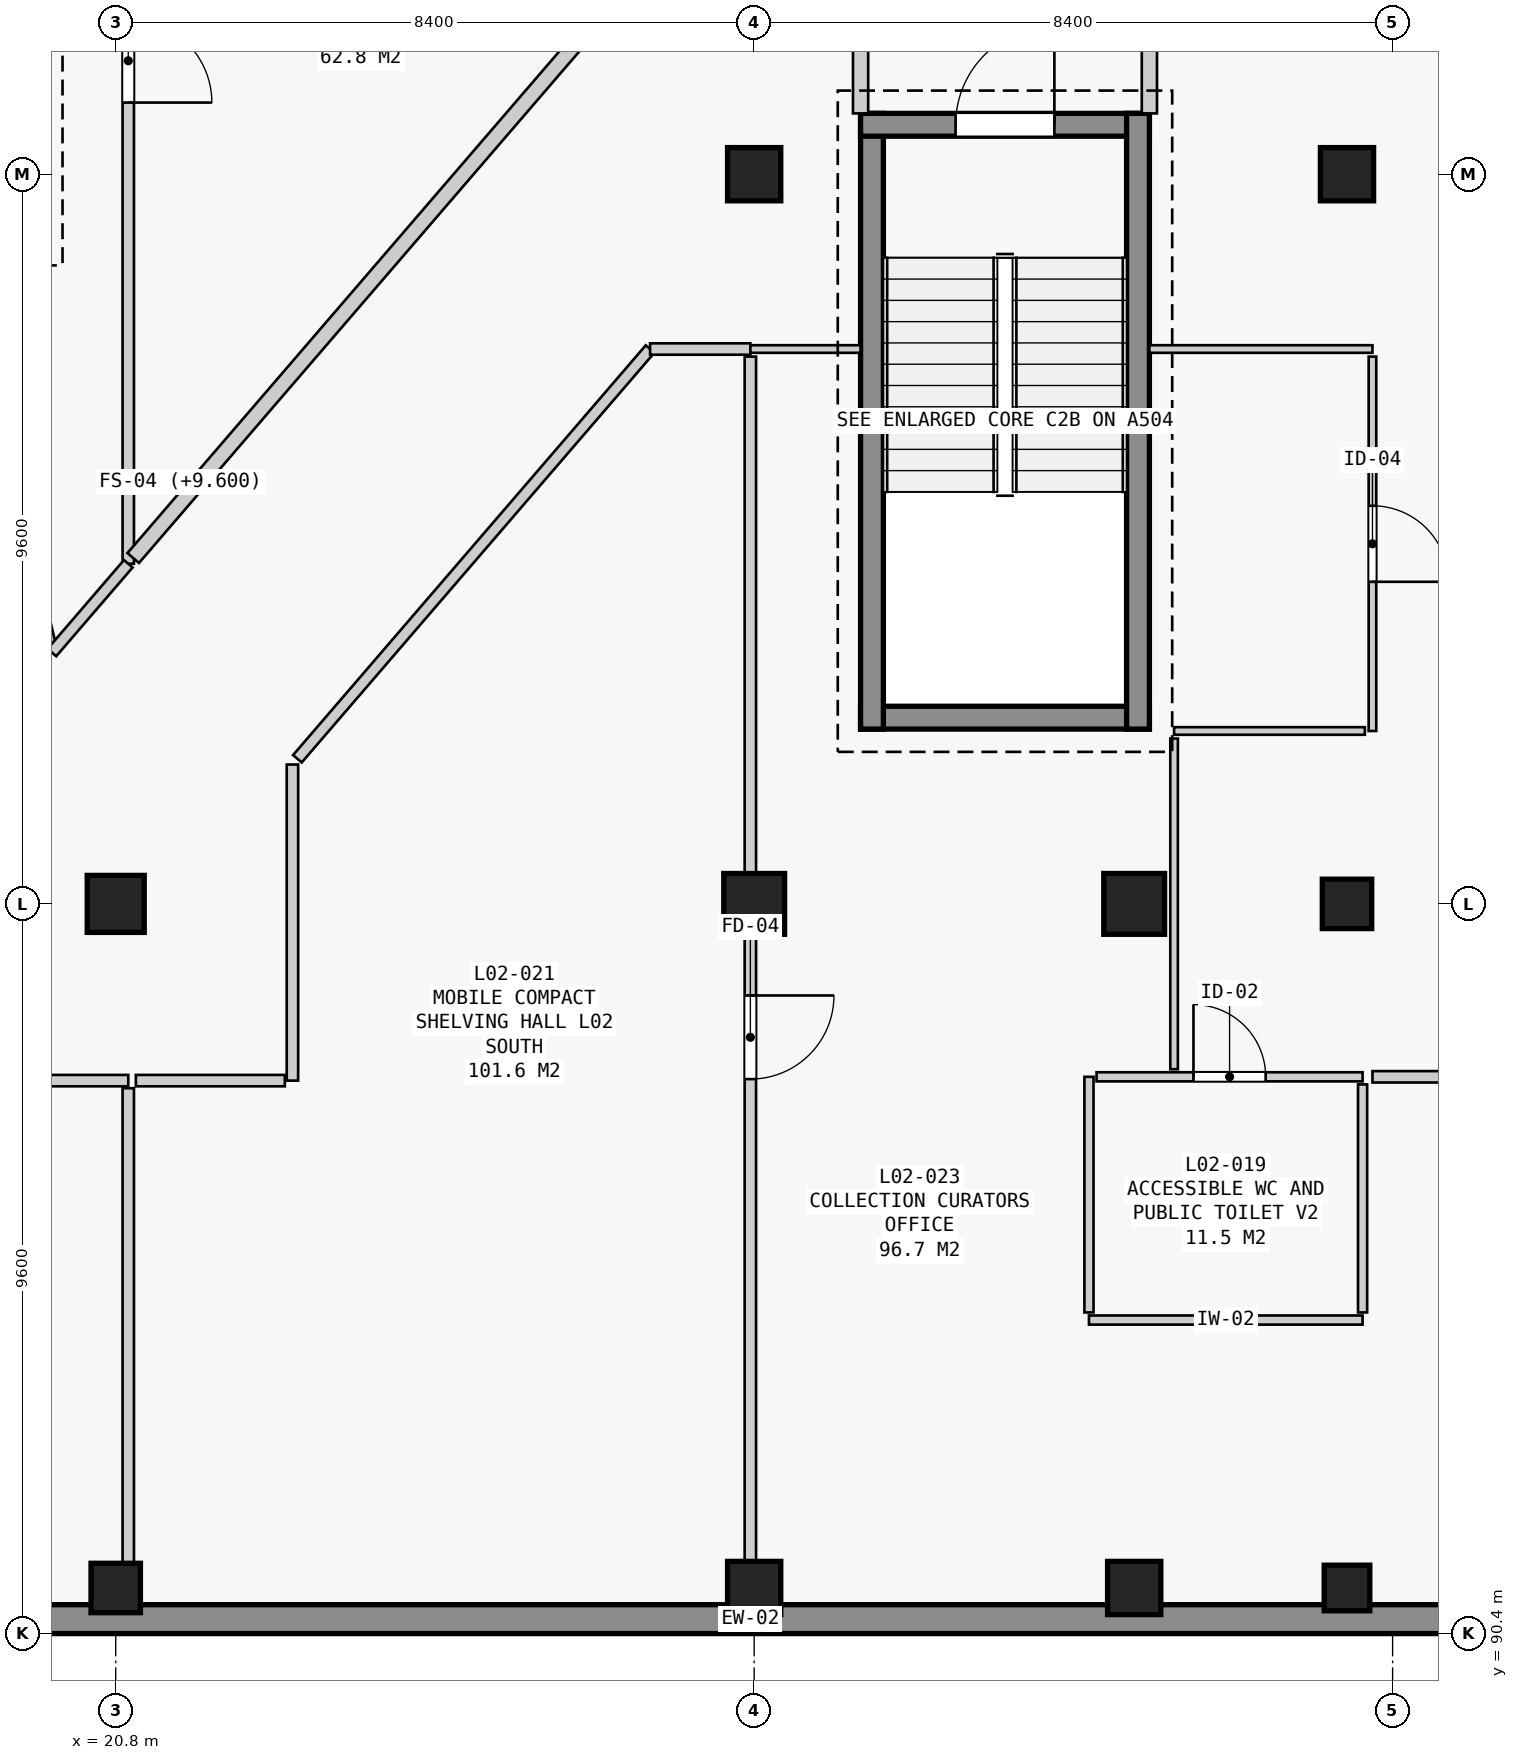
"""IFC4 building model, lengths in metres.
Left out: names, types, materials, properties, quantities, classifications, styles, units other than length and angle.
Written with IfcOpenShell. Run it as: python <this file> out.ifc"""

import sys

from ifc_helpers import new_model, si_unit, direction, frame, frame_2d, origin, origin_2d, place, context, subcontext, project, spatial, rectangle, extrude, element, fill, save


model = new_model("IFC4")
c1 = context("Model", 3, precision=1e-05, world=origin(), true_north=direction((0.0, 1.0)))
c2 = subcontext(c1, "Body", "Model", "MODEL_VIEW")
j1 = project(units=[si_unit("LENGTHUNIT", "METRE"), si_unit("PLANEANGLEUNIT", "RADIAN")], contexts=[c1])
p1 = place(None, origin())
s1 = spatial("IfcSite", under=j1, at=p1, CompositionType="ELEMENT")
p2 = place(p1, origin())
s2 = spatial("IfcBuilding", under=s1, at=p2, CompositionType="ELEMENT")
p3 = place(p2, frame((0.0, 0.0, 9.6)))
s3 = spatial("IfcBuildingStorey", under=s2, at=p3, CompositionType="ELEMENT", Elevation=9.6)
p4 = place(p3, frame((20.8, 91.0, 0.0), z_axis=(0.0, 0.0, 1.0), x_axis=(1.0, 0.0, 0.0)))
e1 = element("IfcColumn", 1, at=p4, inside=s3, PredefinedType="COLUMN", context=c2, shape_type="SweptSolid", body=[
    extrude(rectangle(XDim=0.65, YDim=0.65, at=origin_2d()), origin(), (0.0, 0.0, 1.0), 4.2),
])
p5 = place(p3, frame((20.8, 100.0, 0.0), z_axis=(0.0, 0.0, 1.0), x_axis=(1.0, 0.0, 0.0)))
e2 = element("IfcColumn", 2, at=p5, inside=s3, PredefinedType="COLUMN", context=c2, shape_type="SweptSolid", body=[
    extrude(rectangle(XDim=0.75, YDim=0.75, at=origin_2d()), origin(), (0.0, 0.0, 1.0), 4.2),
])
p6 = place(p3, frame((29.2, 91.0, 0.0), z_axis=(0.0, 0.0, 1.0), x_axis=(1.0, 0.0, 0.0)))
e3 = element("IfcColumn", 3, at=p6, inside=s3, PredefinedType="COLUMN", context=c2, shape_type="SweptSolid", body=[
    extrude(rectangle(XDim=0.7, YDim=0.7, at=origin_2d()), origin(), (0.0, 0.0, 1.0), 4.2),
])
p7 = place(p3, frame((29.2, 100.0, 0.0), z_axis=(0.0, 0.0, 1.0), x_axis=(1.0, 0.0, 0.0)))
e4 = element("IfcColumn", 4, at=p7, inside=s3, PredefinedType="COLUMN", context=c2, shape_type="SweptSolid", body=[
    extrude(rectangle(XDim=0.8, YDim=0.8, at=origin_2d()), origin(), (0.0, 0.0, 1.0), 4.2),
])
for number, where, z_axis, x_axis in (
    (5, (29.2, 109.6, 0.0), (0.0, 0.0, 1.0), (1.0, 0.0, 0.0)),
    (6, (34.2, 91.0, 0.0), (0.0, 0.0, 1.0), (1.0, 0.0, 0.0)),
):
    element("IfcColumn", number, at=place(p3, frame(where, z_axis=z_axis, x_axis=x_axis)), inside=s3, PredefinedType="COLUMN", context=c2, shape_type="SweptSolid", body=[
        extrude(rectangle(XDim=0.7, YDim=0.7, at=origin_2d()), origin(), (0.0, 0.0, 1.0), 4.2),
    ])
p8 = place(p3, frame((34.2, 100.0, 0.0), z_axis=(0.0, 0.0, 1.0), x_axis=(1.0, 0.0, 0.0)))
e7 = element("IfcColumn", 7, at=p8, inside=s3, PredefinedType="COLUMN", context=c2, shape_type="SweptSolid", body=[
    extrude(rectangle(XDim=0.8, YDim=0.8, at=origin_2d()), origin(), (0.0, 0.0, 1.0), 4.2),
])
p9 = place(p3, frame((37.0, 91.0, 0.0), z_axis=(0.0, 0.0, 1.0), x_axis=(1.0, 0.0, 0.0)))
e8 = element("IfcColumn", 8, at=p9, inside=s3, PredefinedType="COLUMN", context=c2, shape_type="SweptSolid", body=[
    extrude(rectangle(XDim=0.6, YDim=0.6, at=origin_2d()), origin(), (0.0, 0.0, 1.0), 4.2),
])
p10 = place(p3, frame((37.0, 100.0, 0.0), z_axis=(0.0, 0.0, 1.0), x_axis=(1.0, 0.0, 0.0)))
e9 = element("IfcColumn", 9, at=p10, inside=s3, PredefinedType="COLUMN", context=c2, shape_type="SweptSolid", body=[
    extrude(rectangle(XDim=0.65, YDim=0.65, at=origin_2d()), origin(), (0.0, 0.0, 1.0), 4.2),
])
p11 = place(p3, frame((37.0, 109.6, 0.0), z_axis=(0.0, 0.0, 1.0), x_axis=(1.0, 0.0, 0.0)))
e10 = element("IfcColumn", 10, at=p11, inside=s3, PredefinedType="COLUMN", context=c2, shape_type="SweptSolid", body=[
    extrude(rectangle(XDim=0.7, YDim=0.7, at=origin_2d()), origin(), (0.0, 0.0, 1.0), 4.2),
])
p12 = place(p3, frame((45.71, 90.59, 0.0), z_axis=(0.0, 0.0, 1.0), x_axis=(-1.0, 0.0, 0.0)))
e11 = element("IfcWall", 11, at=p12, inside=s3, PredefinedType="STANDARD", context=c2, shape_type="SweptSolid", body=[
    extrude(rectangle(XDim=33.12, YDim=0.38, at=frame_2d((16.56, 0.0))), origin(), (0.0, 0.0, 1.0), 3.88),
])
p13 = place(p3, frame((34.4, 102.45, 0.0), z_axis=(0.0, 0.0, 1.0), x_axis=(-1.0, 0.0, 0.0)))
e12 = element("IfcWall", 12, at=p13, inside=s3, PredefinedType="SHEAR", context=c2, shape_type="SweptSolid", body=[
    extrude(rectangle(XDim=3.8, YDim=0.3, at=frame_2d((1.9, 0.0))), origin(), (0.0, 0.0, 1.0), 3.88),
])
p14 = place(p3, frame((30.75, 102.3, 0.0), z_axis=(0.0, 0.0, 1.0), x_axis=(0.0, 1.0, 0.0)))
e13 = element("IfcWall", 13, at=p14, inside=s3, PredefinedType="SHEAR", context=c2, shape_type="SweptSolid", body=[
    extrude(rectangle(XDim=8.1, YDim=0.3, at=frame_2d((4.05, 0.0))), origin(), (0.0, 0.0, 1.0), 3.88),
])
p15 = place(p3, frame((30.6, 110.25, 0.0), z_axis=(0.0, 0.0, 1.0), x_axis=(1.0, 0.0, 0.0)))
e14 = element("IfcWall", 14, at=p15, inside=s3, PredefinedType="SHEAR", context=c2, shape_type="SweptSolid", body=[
    extrude(rectangle(XDim=3.8, YDim=0.3, at=frame_2d((1.9, 0.0))), origin(), (0.0, 0.0, 1.0), 3.88),
])
p16 = place(p15, frame((1.25, 0.0, 0.0)))
e15 = element("IfcOpeningElement", 15, at=p16, cuts=e14, PredefinedType="OPENING", context=c2, shape_type="SweptSolid", body=[
    extrude(rectangle(XDim=1.3, YDim=2.2, at=frame_2d((0.65, 1.1))), frame((0.0, 0.16, 0.0), z_axis=(0.0, -1.0, 0.0), x_axis=(1.0, 0.0, 0.0)), (0.0, 0.0, 1.0), 0.32),
])
p17 = place(p3, frame((34.25, 110.4, 0.0), z_axis=(0.0, 0.0, 1.0), x_axis=(0.0, -1.0, 0.0)))
e16 = element("IfcWall", 16, at=p17, inside=s3, PredefinedType="SHEAR", context=c2, shape_type="SweptSolid", body=[
    extrude(rectangle(XDim=8.1, YDim=0.3, at=frame_2d((4.05, 0.0))), origin(), (0.0, 0.0, 1.0), 3.88),
])
for number, where, z_axis, x_axis in (
    (17, (30.6, 110.4, 0.0), (0.0, 0.0, 1.0), (0.0, 1.0, 0.0)),
    (18, (34.4, 113.8, 0.0), (0.0, 0.0, 1.0), (0.0, -1.0, 0.0)),
):
    element("IfcWall", number, at=place(p3, frame(where, z_axis=z_axis, x_axis=x_axis)), inside=s3, PredefinedType="STANDARD", context=c2, shape_type="SweptSolid", body=[
        extrude(rectangle(XDim=3.4, YDim=0.2, at=frame_2d((1.7, 0.0))), origin(), (0.0, 0.0, 1.0), 3.88),
    ])
p18 = place(p3, frame((37.205, 94.525, 0.0), z_axis=(0.0, 0.0, 1.0), x_axis=(-1.0, 0.0, 0.0)))
e19 = element("IfcWall", 19, at=p18, inside=s3, PredefinedType="PARTITIONING", context=c2, shape_type="SweptSolid", body=[
    extrude(rectangle(XDim=3.6, YDim=0.12, at=frame_2d((1.8, 0.0))), origin(), (0.0, 0.0, 1.0), 3.01),
])
p19 = place(p3, frame((33.605, 94.625, 0.0), z_axis=(0.0, 0.0, 1.0), x_axis=(0.0, 1.0, 0.0)))
e20 = element("IfcWall", 20, at=p19, inside=s3, PredefinedType="PARTITIONING", context=c2, shape_type="SweptSolid", body=[
    extrude(rectangle(XDim=3.1, YDim=0.12, at=frame_2d((1.55, 0.0))), origin(), (0.0, 0.0, 1.0), 3.88),
])
p20 = place(p3, frame((33.705, 97.725, 0.0), z_axis=(0.0, 0.0, 1.0), x_axis=(1.0, 0.0, 0.0)))
e21 = element("IfcWall", 21, at=p20, inside=s3, PredefinedType="PARTITIONING", context=c2, shape_type="SweptSolid", body=[
    extrude(rectangle(XDim=3.5, YDim=0.12, at=frame_2d((1.75, 0.0))), origin(), (0.0, 0.0, 1.0), 3.01),
])
p21 = place(p20, frame((1.275, 0.0, 0.0)))
e22 = element("IfcOpeningElement", 22, at=p21, cuts=e21, PredefinedType="OPENING", context=c2, shape_type="SweptSolid", body=[
    extrude(rectangle(XDim=0.95, YDim=2.15, at=frame_2d((0.475, 1.075))), frame((0.0, 0.07, 0.0), z_axis=(0.0, -1.0, 0.0), x_axis=(1.0, 0.0, 0.0)), (0.0, 0.0, 1.0), 0.14),
])
p22 = place(p3, frame((37.205, 97.625, 0.0), z_axis=(0.0, 0.0, 1.0), x_axis=(0.0, -1.0, 0.0)))
e23 = element("IfcWall", 23, at=p22, inside=s3, PredefinedType="PARTITIONING", context=c2, shape_type="SweptSolid", body=[
    extrude(rectangle(XDim=3.0, YDim=0.12, at=frame_2d((1.5, 0.0))), origin(), (0.0, 0.0, 1.0), 3.01),
])
p23 = place(p3, frame((19.96, 103.307, 0.0), z_axis=(0.0, 0.0, 1.0), x_axis=(-0.229592143179, 0.973286929837, 0.0)))
e24 = element("IfcWall", 24, at=p23, inside=s3, PredefinedType="PARTITIONING", context=c2, shape_type="SweptSolid", body=[
    extrude(rectangle(XDim=2.338, YDim=0.15, at=frame_2d((1.169, 0.0))), origin(), (0.0, 0.0, 1.0), 3.88),
])
p24 = place(p3, frame((18.475, 97.675, 0.0), z_axis=(0.0, 0.0, 1.0), x_axis=(1.0, 0.0, 0.0)))
e25 = element("IfcWall", 25, at=p24, inside=s3, PredefinedType="PARTITIONING", context=c2, shape_type="SweptSolid", body=[
    extrude(rectangle(XDim=2.49, YDim=0.15, at=frame_2d((1.245, 0.0))), origin(), (0.0, 0.0, 1.0), 3.16),
])
p25 = place(p3, frame((20.965, 97.575, 0.0), z_axis=(0.0, 0.0, 1.0), x_axis=(0.0, -1.0, 0.0)))
e26 = element("IfcWall", 26, at=p25, inside=s3, PredefinedType="PARTITIONING", context=c2, shape_type="SweptSolid", body=[
    extrude(rectangle(XDim=6.885, YDim=0.15, at=frame_2d((3.442, 0.0))), origin(), (0.0, 0.0, 1.0), 3.16),
])
p26 = place(p3, frame((20.965, 117.71, 0.0), z_axis=(0.0, 0.0, 1.0), x_axis=(0.0, -1.0, 0.0)))
e27 = element("IfcWall", 27, at=p26, inside=s3, PredefinedType="PARTITIONING", context=c2, shape_type="SweptSolid", body=[
    extrude(rectangle(XDim=13.235, YDim=0.15, at=frame_2d((6.618, 0.0))), origin(), (0.0, 0.0, 1.0), 3.88),
])
p27 = place(p26, frame((6.068, 0.0, 0.0)))
e28 = element("IfcOpeningElement", 28, at=p27, cuts=e27, PredefinedType="OPENING", context=c2, shape_type="SweptSolid", body=[
    extrude(rectangle(XDim=1.1, YDim=2.15, at=frame_2d((0.55, 1.075))), frame((0.0, 0.085, 0.0), z_axis=(0.0, -1.0, 0.0), x_axis=(1.0, 0.0, 0.0)), (0.0, 0.0, 1.0), 0.17),
])
p28 = place(p3, frame((20.965, 104.475, 0.0), z_axis=(0.0, 0.0, 1.0), x_axis=(-0.652368947126, -0.75790154824, 0.0)))
e29 = element("IfcWall", 29, at=p28, inside=s3, PredefinedType="PARTITIONING", context=c2, shape_type="SweptSolid", body=[
    extrude(rectangle(XDim=1.541, YDim=0.15, at=frame_2d((0.771, 0.0))), origin(), (0.0, 0.0, 1.0), 3.88),
])
p29 = place(p3, frame((23.125, 97.675, 0.0), z_axis=(0.0, 0.0, 1.0), x_axis=(0.0, 1.0, 0.0)))
e30 = element("IfcWall", 30, at=p29, inside=s3, PredefinedType="PARTITIONING", context=c2, shape_type="SweptSolid", body=[
    extrude(rectangle(XDim=4.158, YDim=0.15, at=frame_2d((2.079, 0.0))), origin(), (0.0, 0.0, 1.0), 3.01),
])
p30 = place(p3, frame((23.19, 101.909, 0.0), z_axis=(0.0, 0.0, 1.0), x_axis=(0.652381329675, 0.757890889701, 0.0)))
e31 = element("IfcWall", 31, at=p30, inside=s3, PredefinedType="PARTITIONING", context=c2, shape_type="SweptSolid", body=[
    extrude(rectangle(XDim=7.113, YDim=0.15, at=frame_2d((3.557, 0.0))), origin(), (0.0, 0.0, 1.0), 3.88),
])
p31 = place(p3, frame((27.831, 107.3, 0.0), z_axis=(0.0, 0.0, 1.0), x_axis=(1.0, 0.0, 0.0)))
e32 = element("IfcWall", 32, at=p31, inside=s3, PredefinedType="PARTITIONING", context=c2, shape_type="SweptSolid", body=[
    extrude(rectangle(XDim=1.319, YDim=0.15, at=frame_2d((0.66, 0.0))), origin(), (0.0, 0.0, 1.0), 3.06),
])
p32 = place(p3, frame((29.15, 107.2, 0.0), z_axis=(0.0, 0.0, 1.0), x_axis=(0.0, -1.0, 0.0)))
e33 = element("IfcWall", 33, at=p32, inside=s3, PredefinedType="PARTITIONING", context=c2, shape_type="SweptSolid", body=[
    extrude(rectangle(XDim=16.51, YDim=0.15, at=frame_2d((8.255, 0.0))), origin(), (0.0, 0.0, 1.0), 3.06),
])
p33 = place(p32, frame((8.405, 0.0, 0.0)))
e34 = element("IfcOpeningElement", 34, at=p33, cuts=e33, PredefinedType="OPENING", context=c2, shape_type="SweptSolid", body=[
    extrude(rectangle(XDim=1.1, YDim=2.15, at=frame_2d((0.55, 1.075))), frame((0.0, 0.085, 0.0), z_axis=(0.0, -1.0, 0.0), x_axis=(1.0, 0.0, 0.0)), (0.0, 0.0, 1.0), 0.17),
])
p34 = place(p3, frame((21.065, 97.675, 0.0), z_axis=(0.0, 0.0, 1.0), x_axis=(1.0, 0.0, 0.0)))
e35 = element("IfcWall", 35, at=p34, inside=s3, PredefinedType="PARTITIONING", context=c2, shape_type="SweptSolid", body=[
    extrude(rectangle(XDim=1.96, YDim=0.15, at=frame_2d((0.98, 0.0))), origin(), (0.0, 0.0, 1.0), 3.16),
])
p35 = place(p3, frame((26.9, 111.369, 0.0), z_axis=(0.0, 0.0, 1.0), x_axis=(-0.652372072254, -0.757898858254, 0.0)))
e36 = element("IfcWall", 36, at=p35, inside=s3, PredefinedType="STANDARD", context=c2, shape_type="SweptSolid", body=[
    extrude(rectangle(XDim=8.997, YDim=0.2, at=frame_2d((4.499, 0.0))), origin(), (0.0, 0.0, 1.0), 3.88),
])
p36 = place(p3, frame((34.4, 107.3, 0.0), z_axis=(0.0, 0.0, 1.0), x_axis=(1.0, 0.0, 0.0)))
e37 = element("IfcWall", 37, at=p36, inside=s3, PredefinedType="PARTITIONING", context=c2, shape_type="SweptSolid", body=[
    extrude(rectangle(XDim=2.935, YDim=0.1, at=frame_2d((1.468, 0.0))), origin(), (0.0, 0.0, 1.0), 2.96),
])
p37 = place(p3, frame((37.335, 107.2, 0.0), z_axis=(0.0, 0.0, 1.0), x_axis=(0.0, -1.0, 0.0)))
e38 = element("IfcWall", 38, at=p37, inside=s3, PredefinedType="PARTITIONING", context=c2, shape_type="SweptSolid", body=[
    extrude(rectangle(XDim=4.925, YDim=0.1, at=frame_2d((2.462, 0.0))), origin(), (0.0, 0.0, 1.0), 2.96),
])
p38 = place(p37, frame((1.962, 0.0, 0.0)))
e39 = element("IfcOpeningElement", 39, at=p38, cuts=e38, PredefinedType="OPENING", context=c2, shape_type="SweptSolid", body=[
    extrude(rectangle(XDim=1.0, YDim=2.15, at=frame_2d((0.5, 1.075))), frame((0.0, 0.06, 0.0), z_axis=(0.0, -1.0, 0.0), x_axis=(1.0, 0.0, 0.0)), (0.0, 0.0, 1.0), 0.12),
])
p39 = place(p3, frame((37.235, 102.275, 0.0), z_axis=(0.0, 0.0, 1.0), x_axis=(-1.0, 0.0, 0.0)))
e40 = element("IfcWall", 40, at=p39, inside=s3, PredefinedType="PARTITIONING", context=c2, shape_type="SweptSolid", body=[
    extrude(rectangle(XDim=2.51, YDim=0.1, at=frame_2d((1.255, 0.0))), origin(), (0.0, 0.0, 1.0), 2.96),
])
p40 = place(p3, frame((34.725, 102.175, 0.0), z_axis=(0.0, 0.0, 1.0), x_axis=(0.0, -1.0, 0.0)))
e41 = element("IfcWall", 41, at=p40, inside=s3, PredefinedType="PARTITIONING", context=c2, shape_type="SweptSolid", body=[
    extrude(rectangle(XDim=4.35, YDim=0.1, at=frame_2d((2.175, 0.0))), origin(), (0.0, 0.0, 1.0), 3.16),
])
p41 = place(p3, frame((29.15, 107.3, 0.0), z_axis=(0.0, 0.0, 1.0), x_axis=(1.0, 0.0, 0.0)))
e42 = element("IfcWall", 42, at=p41, inside=s3, PredefinedType="PARTITIONING", context=c2, shape_type="SweptSolid", body=[
    extrude(rectangle(XDim=1.45, YDim=0.1, at=frame_2d((0.725, 0.0))), origin(), (0.0, 0.0, 1.0), 3.06),
])
p42 = place(p3, frame((37.335, 97.725, 0.0), z_axis=(0.0, 0.0, 1.0), x_axis=(1.0, 0.0, 0.0)))
e43 = element("IfcWall", 43, at=p42, inside=s3, PredefinedType="PARTITIONING", context=c2, shape_type="SweptSolid", body=[
    extrude(rectangle(XDim=1.94, YDim=0.15, at=frame_2d((0.97, 0.0))), origin(), (0.0, 0.0, 1.0), 3.88),
])
p43 = place(p16, origin())
e44 = element("IfcDoor", 44, at=p43, inside=s3, OperationType="SINGLE_SWING_RIGHT", PredefinedType="DOOR", context=c2, shape_type="SweptSolid", body=[
    extrude(rectangle(XDim=1.3, YDim=2.2, at=frame_2d((0.65, 1.1))), frame((0.0, 0.025, 0.0), z_axis=(0.0, -1.0, 0.0), x_axis=(1.0, 0.0, 0.0)), (0.0, 0.0, 1.0), 0.05),
])
fill(e15, e44)
p44 = place(p21, origin())
e45 = element("IfcDoor", 45, at=p44, inside=s3, OperationType="SINGLE_SWING_LEFT", PredefinedType="DOOR", context=c2, shape_type="SweptSolid", body=[
    extrude(rectangle(XDim=0.95, YDim=2.15, at=frame_2d((0.475, 1.075))), frame((0.0, 0.025, 0.0), z_axis=(0.0, -1.0, 0.0), x_axis=(1.0, 0.0, 0.0)), (0.0, 0.0, 1.0), 0.05),
])
fill(e22, e45)
p45 = place(p27, origin())
e46 = element("IfcDoor", 46, at=p45, inside=s3, OperationType="SINGLE_SWING_RIGHT", PredefinedType="DOOR", context=c2, shape_type="SweptSolid", body=[
    extrude(rectangle(XDim=1.1, YDim=2.15, at=frame_2d((0.55, 1.075))), frame((0.0, 0.025, 0.0), z_axis=(0.0, -1.0, 0.0), x_axis=(1.0, 0.0, 0.0)), (0.0, 0.0, 1.0), 0.05),
])
fill(e28, e46)
p46 = place(p33, origin())
e47 = element("IfcDoor", 47, at=p46, inside=s3, OperationType="SINGLE_SWING_LEFT", PredefinedType="DOOR", context=c2, shape_type="SweptSolid", body=[
    extrude(rectangle(XDim=1.1, YDim=2.15, at=frame_2d((0.55, 1.075))), frame((0.0, 0.025, 0.0), z_axis=(0.0, -1.0, 0.0), x_axis=(1.0, 0.0, 0.0)), (0.0, 0.0, 1.0), 0.05),
])
fill(e34, e47)
p47 = place(p38, origin())
e48 = element("IfcDoor", 48, at=p47, inside=s3, OperationType="SINGLE_SWING_RIGHT", PredefinedType="DOOR", context=c2, shape_type="SweptSolid", body=[
    extrude(rectangle(XDim=1.0, YDim=2.15, at=frame_2d((0.5, 1.075))), frame((0.0, 0.025, 0.0), z_axis=(0.0, -1.0, 0.0), x_axis=(1.0, 0.0, 0.0)), (0.0, 0.0, 1.0), 0.05),
])
fill(e39, e48)
save(model, sys.argv[1])
